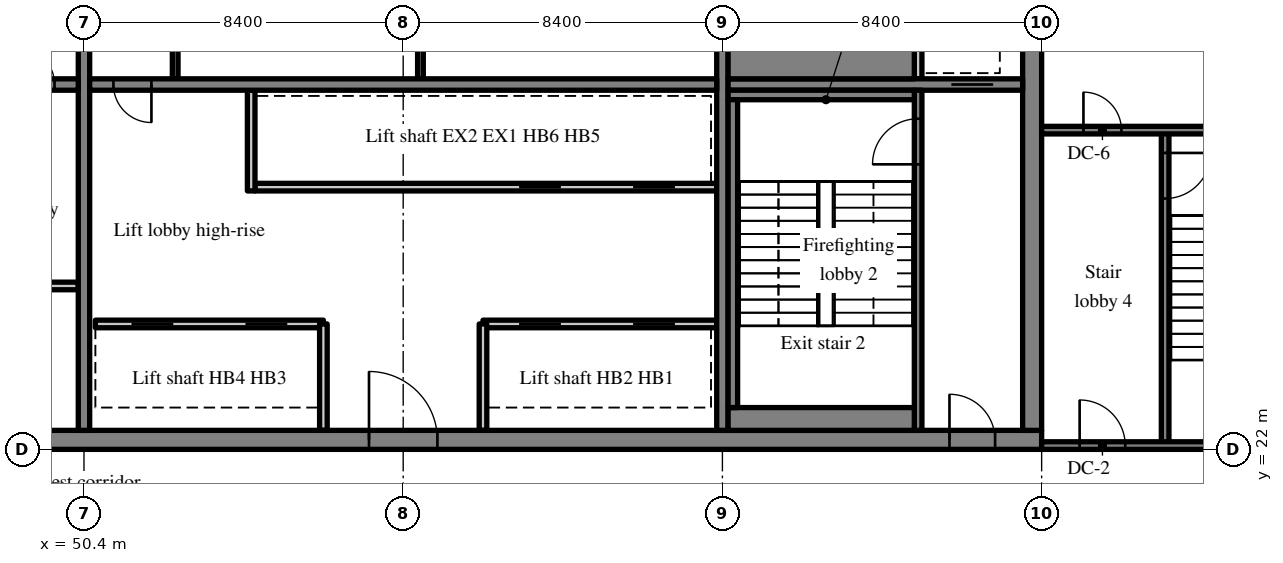
"""IFC4 building model, lengths in metres.
Left out: names, types, materials, properties, quantities, classifications, styles, units other than length and angle.
Written with IfcOpenShell. Run it as: python <this file> out.ifc"""

import sys

from ifc_helpers import new_model, si_unit, direction, frame, frame_2d, origin, place, context, subcontext, project, spatial, rectangle, extrude, source, transform, mapped, element, fill, save


model = new_model("IFC4")
c1 = context("Model", 3, precision=1e-05, world=origin(), true_north=direction((0.0, 1.0)))
c2 = subcontext(c1, "Body", "Model", "MODEL_VIEW")
j1 = project(units=[si_unit("LENGTHUNIT", "METRE"), si_unit("PLANEANGLEUNIT", "RADIAN")], contexts=[c1])
p1 = place(None, origin())
s1 = spatial("IfcSite", under=j1, at=p1, CompositionType="ELEMENT")
p2 = place(p1, origin())
s2 = spatial("IfcBuilding", under=s1, at=p2, CompositionType="ELEMENT")
p3 = place(p2, frame((0.0, 0.0, 285.7)))
s3 = spatial("IfcBuildingStorey", under=s2, at=p3, CompositionType="ELEMENT", Elevation=285.7)
m1 = source(origin(), c2, "Body", "SweptSolid", [
    extrude(rectangle(XDim=50.4, YDim=0.5, at=frame_2d((25.2, 0.0))), origin(), (0.0, 0.0, 1.0), 3.72),
])
p4 = place(p3, frame((25.2, 22.25, 0.0), z_axis=(0.0, 0.0, 1.0), x_axis=(1.0, 0.0, 0.0)))
e1 = element("IfcWall", 1, at=p4, inside=s3, PredefinedType="SHEAR", context=c2, shape_type="MappedRepresentation", body=[
    mapped(m1, transform((0.0, 0.0, 0.0), scale=1.0)),
])
m2 = source(origin(), c2, "Body", "SweptSolid", [
    extrude(rectangle(XDim=1.8, YDim=2.1, at=frame_2d((0.9, 1.05))), frame((0.0, 0.26, 0.0), z_axis=(0.0, -1.0, 0.0), x_axis=(1.0, 0.0, 0.0)), (0.0, 0.0, 1.0), 0.52),
])
p5 = place(p4, frame((15.9, 0.0, 0.0)))
e2 = element("IfcOpeningElement", 2, at=p5, cuts=e1, PredefinedType="OPENING", context=c2, shape_type="MappedRepresentation", body=[
    mapped(m2, transform((0.0, 0.0, 0.0), scale=1.0)),
])
m3 = source(origin(), c2, "Body", "SweptSolid", [
    extrude(rectangle(XDim=0.9, YDim=2.1, at=frame_2d((0.45, 1.05))), frame((0.0, 0.26, 0.0), z_axis=(0.0, -1.0, 0.0), x_axis=(1.0, 0.0, 0.0)), (0.0, 0.0, 1.0), 0.52),
])
p6 = place(p4, frame((21.525, 0.0, 0.0)))
e3 = element("IfcOpeningElement", 3, at=p6, cuts=e1, PredefinedType="OPENING", context=c2, shape_type="MappedRepresentation", body=[
    mapped(m3, transform((0.0, 0.0, 0.0), scale=1.0)),
])
p7 = place(p4, frame((32.7, 0.0, 0.0)))
e4 = element("IfcOpeningElement", 4, at=p7, cuts=e1, PredefinedType="OPENING", context=c2, shape_type="MappedRepresentation", body=[
    mapped(m2, transform((0.0, 0.0, 0.0), scale=1.0)),
])
m4 = source(origin(), c2, "Body", "SweptSolid", [
    extrude(rectangle(XDim=1.2, YDim=2.1, at=frame_2d((0.6, 1.05))), frame((0.0, 0.26, 0.0), z_axis=(0.0, -1.0, 0.0), x_axis=(1.0, 0.0, 0.0)), (0.0, 0.0, 1.0), 0.52),
])
p8 = place(p4, frame((6.5, 0.0, 0.0)))
e5 = element("IfcOpeningElement", 5, at=p8, cuts=e1, PredefinedType="OPENING", context=c2, shape_type="MappedRepresentation", body=[
    mapped(m4, transform((0.0, 0.0, 0.0), scale=1.0)),
])
p9 = place(p4, frame((47.975, 0.0, 0.0)))
e6 = element("IfcOpeningElement", 6, at=p9, cuts=e1, PredefinedType="OPENING", context=c2, shape_type="MappedRepresentation", body=[
    mapped(m4, transform((0.0, 0.0, 0.0), scale=1.0)),
])
m5 = source(origin(), c2, "Body", "SweptSolid", [
    extrude(rectangle(XDim=19.0, YDim=0.5, at=frame_2d((9.5, 0.0))), origin(), (0.0, 0.0, 1.0), 3.72),
])
p10 = place(p3, frame((75.35, 22.5, 0.0), z_axis=(0.0, 0.0, 1.0), x_axis=(0.0, 1.0, 0.0)))
e7 = element("IfcWall", 7, at=p10, inside=s3, PredefinedType="SHEAR", context=c2, shape_type="MappedRepresentation", body=[
    mapped(m5, transform((0.0, 0.0, 0.0), scale=1.0)),
])
p11 = place(p10, frame((12.9, 0.0, 0.0)))
e8 = element("IfcOpeningElement", 8, at=p11, cuts=e7, PredefinedType="OPENING", context=c2, shape_type="MappedRepresentation", body=[
    mapped(m4, transform((0.0, 0.0, 0.0), scale=1.0)),
])
m6 = source(origin(), c2, "Body", "SweptSolid", [
    extrude(rectangle(XDim=19.0, YDim=0.3, at=frame_2d((9.5, 0.0))), origin(), (0.0, 0.0, 1.0), 3.72),
])
p12 = place(p3, frame((50.4, 22.5, 0.0), z_axis=(0.0, 0.0, 1.0), x_axis=(0.0, 1.0, 0.0)))
e9 = element("IfcWall", 9, at=p12, inside=s3, PredefinedType="SHEAR", context=c2, shape_type="MappedRepresentation", body=[
    mapped(m6, transform((0.0, 0.0, 0.0), scale=1.0)),
])
m7 = source(origin(), c2, "Body", "SweptSolid", [
    extrude(rectangle(XDim=1.1, YDim=2.1, at=frame_2d((0.55, 1.05))), frame((0.0, 0.16, 0.0), z_axis=(0.0, -1.0, 0.0), x_axis=(1.0, 0.0, 0.0)), (0.0, 0.0, 1.0), 0.32),
])
p13 = place(p12, frame((12.95, 0.0, 0.0)))
e10 = element("IfcOpeningElement", 10, at=p13, cuts=e9, PredefinedType="OPENING", context=c2, shape_type="MappedRepresentation", body=[
    mapped(m7, transform((0.0, 0.0, 0.0), scale=1.0)),
])
p14 = place(p3, frame((67.2, 22.5, 0.0), z_axis=(0.0, 0.0, 1.0), x_axis=(0.0, 1.0, 0.0)))
e11 = element("IfcWall", 11, at=p14, inside=s3, PredefinedType="SHEAR", context=c2, shape_type="MappedRepresentation", body=[
    mapped(m6, transform((0.0, 0.0, 0.0), scale=1.0)),
])
m8 = source(origin(), c2, "Body", "SweptSolid", [
    extrude(rectangle(XDim=16.5, YDim=0.3, at=frame_2d((8.25, 0.0))), origin(), (0.0, 0.0, 1.0), 3.72),
])
p15 = place(p3, frame((33.75, 31.6, 0.0), z_axis=(0.0, 0.0, 1.0), x_axis=(1.0, 0.0, 0.0)))
e12 = element("IfcWall", 12, at=p15, inside=s3, PredefinedType="SHEAR", context=c2, shape_type="MappedRepresentation", body=[
    mapped(m8, transform((0.0, 0.0, 0.0), scale=1.0)),
])
m9 = source(origin(), c2, "Body", "SweptSolid", [
    extrude(rectangle(XDim=1.0, YDim=2.1, at=frame_2d((0.5, 1.05))), frame((0.0, 0.16, 0.0), z_axis=(0.0, -1.0, 0.0), x_axis=(1.0, 0.0, 0.0)), (0.0, 0.0, 1.0), 0.32),
])
p16 = place(p15, frame((14.875, 0.0, 0.0)))
e13 = element("IfcOpeningElement", 13, at=p16, cuts=e12, PredefinedType="OPENING", context=c2, shape_type="MappedRepresentation", body=[
    mapped(m9, transform((0.0, 0.0, 0.0), scale=1.0)),
])
p17 = place(p3, frame((50.55, 31.6, 0.0), z_axis=(0.0, 0.0, 1.0), x_axis=(1.0, 0.0, 0.0)))
e14 = element("IfcWall", 14, at=p17, inside=s3, PredefinedType="SHEAR", context=c2, shape_type="MappedRepresentation", body=[
    mapped(m8, transform((0.0, 0.0, 0.0), scale=1.0)),
])
p18 = place(p17, frame((0.625, 0.0, 0.0)))
e15 = element("IfcOpeningElement", 15, at=p18, cuts=e14, PredefinedType="OPENING", context=c2, shape_type="MappedRepresentation", body=[
    mapped(m9, transform((0.0, 0.0, 0.0), scale=1.0)),
])
m10 = source(origin(), c2, "Body", "SweptSolid", [
    extrude(rectangle(XDim=7.75, YDim=0.3, at=frame_2d((3.875, 0.0))), origin(), (0.0, 0.0, 1.0), 3.72),
])
p19 = place(p3, frame((67.35, 31.6, 0.0), z_axis=(0.0, 0.0, 1.0), x_axis=(1.0, 0.0, 0.0)))
e16 = element("IfcWall", 16, at=p19, inside=s3, PredefinedType="SHEAR", context=c2, shape_type="MappedRepresentation", body=[
    mapped(m10, transform((0.0, 0.0, 0.0), scale=1.0)),
])
p20 = place(p19, frame((5.875, 0.0, 0.0)))
e17 = element("IfcOpeningElement", 17, at=p20, cuts=e16, PredefinedType="OPENING", context=c2, shape_type="MappedRepresentation", body=[
    mapped(m7, transform((0.0, 0.0, 0.0), scale=1.0)),
])
m11 = source(origin(), c2, "Body", "SweptSolid", [
    extrude(rectangle(XDim=6.15, YDim=0.2, at=frame_2d((3.075, 0.0))), origin(), (0.0, 0.0, 1.0), 3.72),
])
p21 = place(p3, frame((44.1, 26.3, 0.0), z_axis=(0.0, 0.0, 1.0), x_axis=(1.0, 0.0, 0.0)))
e18 = element("IfcWall", 18, at=p21, inside=s3, PredefinedType="PARTITIONING", context=c2, shape_type="MappedRepresentation", body=[
    mapped(m11, transform((0.0, 0.0, 0.0), scale=1.0)),
])
m12 = source(origin(), c2, "Body", "SweptSolid", [
    extrude(rectangle(XDim=6.15, YDim=0.2, at=frame_2d((3.075, 0.0))), origin(), (0.0, 0.0, 1.0), 3.72),
])
p22 = place(p3, frame((67.05, 25.3, 0.0), z_axis=(0.0, 0.0, 1.0), x_axis=(-1.0, 0.0, 0.0)))
e19 = element("IfcWall", 19, at=p22, inside=s3, PredefinedType="SOLIDWALL", context=c2, shape_type="MappedRepresentation", body=[
    mapped(m12, transform((0.0, 0.0, 0.0), scale=1.0)),
])
m13 = source(origin(), c2, "Body", "SweptSolid", [
    extrude(rectangle(XDim=1.1, YDim=2.1, at=frame_2d((0.55, 1.05))), frame((0.0, 0.11, 0.0), z_axis=(0.0, -1.0, 0.0), x_axis=(1.0, 0.0, 0.0)), (0.0, 0.0, 1.0), 0.22),
])
p23 = place(p22, frame((1.1, 0.0, 0.0)))
e20 = element("IfcOpeningElement", 20, at=p23, cuts=e19, PredefinedType="OPENING", context=c2, shape_type="MappedRepresentation", body=[
    mapped(m13, transform((0.0, 0.0, 0.0), scale=1.0)),
])
p24 = place(p22, frame((4.1, 0.0, 0.0)))
e21 = element("IfcOpeningElement", 21, at=p24, cuts=e19, PredefinedType="OPENING", context=c2, shape_type="MappedRepresentation", body=[
    mapped(m13, transform((0.0, 0.0, 0.0), scale=1.0)),
])
m14 = source(origin(), c2, "Body", "SweptSolid", [
    extrude(rectangle(XDim=6.0, YDim=0.2, at=frame_2d((3.0, 0.0))), origin(), (0.0, 0.0, 1.0), 3.72),
])
p25 = place(p3, frame((56.7, 25.3, 0.0), z_axis=(0.0, 0.0, 1.0), x_axis=(-1.0, 0.0, 0.0)))
e22 = element("IfcWall", 22, at=p25, inside=s3, PredefinedType="SOLIDWALL", context=c2, shape_type="MappedRepresentation", body=[
    mapped(m14, transform((0.0, 0.0, 0.0), scale=1.0)),
])
p26 = place(p25, frame((0.95, 0.0, 0.0)))
e23 = element("IfcOpeningElement", 23, at=p26, cuts=e22, PredefinedType="OPENING", context=c2, shape_type="MappedRepresentation", body=[
    mapped(m13, transform((0.0, 0.0, 0.0), scale=1.0)),
])
p27 = place(p25, frame((3.95, 0.0, 0.0)))
e24 = element("IfcOpeningElement", 24, at=p27, cuts=e22, PredefinedType="OPENING", context=c2, shape_type="MappedRepresentation", body=[
    mapped(m13, transform((0.0, 0.0, 0.0), scale=1.0)),
])
m15 = source(origin(), c2, "Body", "SweptSolid", [
    extrude(rectangle(XDim=12.15, YDim=0.2, at=frame_2d((6.075, 0.0))), origin(), (0.0, 0.0, 1.0), 3.72),
])
p28 = place(p3, frame((67.05, 28.9, 0.0), z_axis=(0.0, 0.0, 1.0), x_axis=(-1.0, 0.0, 0.0)))
e25 = element("IfcWall", 25, at=p28, inside=s3, PredefinedType="SOLIDWALL", context=c2, shape_type="MappedRepresentation", body=[
    mapped(m15, transform((0.0, 0.0, 0.0), scale=1.0)),
])
p29 = place(p28, frame((1.1, 0.0, 0.0)))
e26 = element("IfcOpeningElement", 26, at=p29, cuts=e25, PredefinedType="OPENING", context=c2, shape_type="MappedRepresentation", body=[
    mapped(m13, transform((0.0, 0.0, 0.0), scale=1.0)),
])
p30 = place(p28, frame((4.1, 0.0, 0.0)))
e27 = element("IfcOpeningElement", 27, at=p30, cuts=e25, PredefinedType="OPENING", context=c2, shape_type="MappedRepresentation", body=[
    mapped(m13, transform((0.0, 0.0, 0.0), scale=1.0)),
])
m16 = source(origin(), c2, "Body", "SweptSolid", [
    extrude(rectangle(XDim=2.8, YDim=0.2, at=frame_2d((1.4, 0.0))), origin(), (0.0, 0.0, 1.0), 3.72),
])
for number, where, z_axis, x_axis in (
    (28, (60.9, 22.5, 0.0), (0.0, 0.0, 1.0), (0.0, 1.0, 0.0)),
    (29, (56.7, 22.5, 0.0), (0.0, 0.0, 1.0), (0.0, 1.0, 0.0)),
):
    element("IfcWall", number, at=place(p3, frame(where, z_axis=z_axis, x_axis=x_axis)), inside=s3, PredefinedType="SOLIDWALL", context=c2, shape_type="MappedRepresentation", body=[
        mapped(m16, transform((0.0, 0.0, 0.0), scale=1.0)),
    ])
m17 = source(origin(), c2, "Body", "SweptSolid", [
    extrude(rectangle(XDim=2.65, YDim=0.2, at=frame_2d((1.325, 0.0))), origin(), (0.0, 0.0, 1.0), 3.72),
])
p31 = place(p3, frame((54.8, 28.8, 0.0), z_axis=(0.0, 0.0, 1.0), x_axis=(0.0, 1.0, 0.0)))
e30 = element("IfcWall", 30, at=p31, inside=s3, PredefinedType="SOLIDWALL", context=c2, shape_type="MappedRepresentation", body=[
    mapped(m17, transform((0.0, 0.0, 0.0), scale=1.0)),
])
m18 = source(origin(), c2, "Body", "SweptSolid", [
    extrude(rectangle(XDim=3.25, YDim=0.15, at=frame_2d((1.625, 0.0))), origin(), (0.0, 0.0, 1.0), 3.72),
])
for number, where, z_axis, x_axis in (
    (31, (52.8, 31.75, 0.0), (0.0, 0.0, 1.0), (0.0, 1.0, 0.0)),
    (32, (59.254, 31.75, 0.0), (0.0, 0.0, 1.0), (0.0, 1.0, 0.0)),
):
    element("IfcWall", number, at=place(p3, frame(where, z_axis=z_axis, x_axis=x_axis)), inside=s3, PredefinedType="PARTITIONING", context=c2, shape_type="MappedRepresentation", body=[
        mapped(m18, transform((0.0, 0.0, 0.0), scale=1.0)),
    ])
m19 = source(origin(), c2, "Body", "SweptSolid", [
    extrude(rectangle(XDim=8.95, YDim=0.2, at=frame_2d((4.475, 0.0))), origin(), (0.0, 0.0, 1.0), 3.72),
])
p32 = place(p3, frame((72.35, 22.5, 0.0), z_axis=(0.0, 0.0, 1.0), x_axis=(0.0, 1.0, 0.0)))
e33 = element("IfcWall", 33, at=p32, inside=s3, PredefinedType="SOLIDWALL", context=c2, shape_type="MappedRepresentation", body=[
    mapped(m19, transform((0.0, 0.0, 0.0), scale=1.0)),
])
m20 = source(origin(), c2, "Body", "SweptSolid", [
    extrude(rectangle(XDim=1.2, YDim=2.1, at=frame_2d((0.6, 1.05))), frame((0.0, 0.11, 0.0), z_axis=(0.0, -1.0, 0.0), x_axis=(1.0, 0.0, 0.0)), (0.0, 0.0, 1.0), 0.22),
])
p33 = place(p32, frame((7.0, 0.0, 0.0)))
e34 = element("IfcOpeningElement", 34, at=p33, cuts=e33, PredefinedType="OPENING", context=c2, shape_type="MappedRepresentation", body=[
    mapped(m20, transform((0.0, 0.0, 0.0), scale=1.0)),
])
m21 = source(origin(), c2, "Body", "SweptSolid", [
    extrude(rectangle(XDim=1.85, YDim=0.2, at=frame_2d((0.925, 0.0))), origin(), (0.0, 0.0, 1.0), 3.72),
])
p34 = place(p3, frame((72.35, 31.75, 0.0), z_axis=(0.0, 0.0, 1.0), x_axis=(0.0, 1.0, 0.0)))
e35 = element("IfcWall", 35, at=p34, inside=s3, PredefinedType="SOLIDWALL", context=c2, shape_type="MappedRepresentation", body=[
    mapped(m21, transform((0.0, 0.0, 0.0), scale=1.0)),
])
m22 = source(origin(), c2, "Body", "SweptSolid", [
    extrude(rectangle(XDim=8.3, YDim=0.2, at=frame_2d((4.15, 0.0))), origin(), (0.0, 0.0, 1.0), 3.72),
])
p35 = place(p3, frame((78.85, 22.1, 0.0), z_axis=(0.0, 0.0, 1.0), x_axis=(0.0, 1.0, 0.0)))
e36 = element("IfcWall", 36, at=p35, inside=s3, PredefinedType="SOLIDWALL", context=c2, shape_type="MappedRepresentation", body=[
    mapped(m22, transform((0.0, 0.0, 0.0), scale=1.0)),
])
p36 = place(p35, frame((6.5, 0.0, 0.0)))
e37 = element("IfcOpeningElement", 37, at=p36, cuts=e36, PredefinedType="OPENING", context=c2, shape_type="MappedRepresentation", body=[
    mapped(m20, transform((0.0, 0.0, 0.0), scale=1.0)),
])
m23 = source(origin(), c2, "Body", "SweptSolid", [
    extrude(rectangle(XDim=8.15, YDim=0.2, at=frame_2d((4.075, 0.0))), origin(), (0.0, 0.0, 1.0), 3.72),
])
p37 = place(p3, frame((83.75, 22.1, 0.0), z_axis=(0.0, 0.0, 1.0), x_axis=(-1.0, 0.0, 0.0)))
e38 = element("IfcWall", 38, at=p37, inside=s3, PredefinedType="SOLIDWALL", context=c2, shape_type="MappedRepresentation", body=[
    mapped(m23, transform((0.0, 0.0, 0.0), scale=1.0)),
])
p38 = place(p37, frame((5.95, 0.0, 0.0)))
e39 = element("IfcOpeningElement", 39, at=p38, cuts=e38, PredefinedType="OPENING", context=c2, shape_type="MappedRepresentation", body=[
    mapped(m20, transform((0.0, 0.0, 0.0), scale=1.0)),
])
p39 = place(p3, frame((83.75, 30.4, 0.0), z_axis=(0.0, 0.0, 1.0), x_axis=(-1.0, 0.0, 0.0)))
e40 = element("IfcWall", 40, at=p39, inside=s3, PredefinedType="SOLIDWALL", context=c2, shape_type="MappedRepresentation", body=[
    mapped(m23, transform((0.0, 0.0, 0.0), scale=1.0)),
])
m24 = source(origin(), c2, "Body", "SweptSolid", [
    extrude(rectangle(XDim=1.0, YDim=2.1, at=frame_2d((0.5, 1.05))), frame((0.0, 0.11, 0.0), z_axis=(0.0, -1.0, 0.0), x_axis=(1.0, 0.0, 0.0)), (0.0, 0.0, 1.0), 0.22),
])
p40 = place(p39, frame((6.05, 0.0, 0.0)))
e41 = element("IfcOpeningElement", 41, at=p40, cuts=e40, PredefinedType="OPENING", context=c2, shape_type="MappedRepresentation", body=[
    mapped(m24, transform((0.0, 0.0, 0.0), scale=1.0)),
])
m25 = source(origin(), c2, "Body", "SweptSolid", [
    extrude(rectangle(XDim=4.9, YDim=0.6, at=frame_2d((2.45, 0.0))), origin(), (0.0, 0.0, 1.0), 3.72),
])
p41 = place(p3, frame((67.35, 22.8, 0.0), z_axis=(0.0, 0.0, 1.0), x_axis=(1.0, 0.0, 0.0)))
e42 = element("IfcWall", 42, at=p41, inside=s3, PredefinedType="SOLIDWALL", context=c2, shape_type="MappedRepresentation", body=[
    mapped(m25, transform((0.0, 0.0, 0.0), scale=1.0)),
])
m26 = source(origin(), c2, "Body", "SweptSolid", [
    extrude(rectangle(XDim=4.9, YDim=0.25, at=frame_2d((2.45, 0.0))), origin(), (0.0, 0.0, 1.0), 3.72),
])
p42 = place(p3, frame((67.35, 31.325, 0.0), z_axis=(0.0, 0.0, 1.0), x_axis=(1.0, 0.0, 0.0)))
e43 = element("IfcWall", 43, at=p42, inside=s3, PredefinedType="SOLIDWALL", context=c2, shape_type="MappedRepresentation", body=[
    mapped(m26, transform((0.0, 0.0, 0.0), scale=1.0)),
])
m27 = source(origin(), c2, "Body", "SweptSolid", [
    extrude(rectangle(XDim=8.1, YDim=0.25, at=frame_2d((4.05, 0.0))), origin(), (0.0, 0.0, 1.0), 3.72),
])
p43 = place(p3, frame((67.475, 23.1, 0.0), z_axis=(0.0, 0.0, 1.0), x_axis=(0.0, 1.0, 0.0)))
e44 = element("IfcWall", 44, at=p43, inside=s3, PredefinedType="SOLIDWALL", context=c2, shape_type="MappedRepresentation", body=[
    mapped(m27, transform((0.0, 0.0, 0.0), scale=1.0)),
])
m28 = source(origin(), c2, "Body", "SweptSolid", [
    extrude(rectangle(XDim=4.9, YDim=1.05, at=frame_2d((2.45, 0.0))), origin(), (0.0, 0.0, 1.0), 3.72),
])
p44 = place(p3, frame((67.35, 32.275, 0.0), z_axis=(0.0, 0.0, 1.0), x_axis=(1.0, 0.0, 0.0)))
e45 = element("IfcWall", 45, at=p44, inside=s3, PredefinedType="SOLIDWALL", context=c2, shape_type="MappedRepresentation", body=[
    mapped(m28, transform((0.0, 0.0, 0.0), scale=1.0)),
])
m29 = source(origin(), c2, "Body", "SweptSolid", [
    extrude(rectangle(XDim=1.0, YDim=2.1, at=frame_2d((0.5, 1.05))), frame((0.0, 0.025, 0.0), z_axis=(0.0, -1.0, 0.0), x_axis=(1.0, 0.0, 0.0)), (0.0, 0.0, 1.0), 0.05),
])
p45 = place(p16, origin())
e46 = element("IfcDoor", 46, at=p45, inside=s3, OperationType="SINGLE_SWING_LEFT", PredefinedType="DOOR", context=c2, shape_type="MappedRepresentation", body=[
    mapped(m29, transform((0.0, 0.0, 0.0), scale=1.0)),
])
fill(e13, e46)
m30 = source(origin(), c2, "Body", "SweptSolid", [
    extrude(rectangle(XDim=1.8, YDim=2.1, at=frame_2d((0.9, 1.05))), frame((0.0, 0.175, 0.0), z_axis=(0.0, -1.0, 0.0), x_axis=(1.0, 0.0, 0.0)), (0.0, 0.0, 1.0), 0.05),
])
p46 = place(p7, origin())
e47 = element("IfcDoor", 47, at=p46, inside=s3, OperationType="DOUBLE_DOOR_SINGLE_SWING", PredefinedType="DOOR", context=c2, shape_type="MappedRepresentation", body=[
    mapped(m30, transform((0.0, 0.0, 0.0), scale=1.0)),
])
fill(e4, e47)
p47 = place(p18, origin())
e48 = element("IfcDoor", 48, at=p47, inside=s3, OperationType="SINGLE_SWING_RIGHT", PredefinedType="DOOR", context=c2, shape_type="MappedRepresentation", body=[
    mapped(m29, transform((0.0, 0.0, 0.0), scale=1.0)),
])
fill(e15, e48)
m31 = source(origin(), c2, "Body", "SweptSolid", [
    extrude(rectangle(XDim=1.1, YDim=2.1, at=frame_2d((0.55, 1.05))), frame((0.0, 0.025, 0.0), z_axis=(0.0, -1.0, 0.0), x_axis=(1.0, 0.0, 0.0)), (0.0, 0.0, 1.0), 0.05),
])
p48 = place(p23, origin())
e49 = element("IfcDoor", 49, at=p48, inside=s3, OperationType="SLIDING_TO_RIGHT", PredefinedType="DOOR", context=c2, shape_type="MappedRepresentation", body=[
    mapped(m31, transform((0.0, 0.0, 0.0), scale=1.0)),
])
fill(e20, e49)
p49 = place(p24, origin())
e50 = element("IfcDoor", 50, at=p49, inside=s3, OperationType="SLIDING_TO_LEFT", PredefinedType="DOOR", context=c2, shape_type="MappedRepresentation", body=[
    mapped(m31, transform((0.0, 0.0, 0.0), scale=1.0)),
])
fill(e21, e50)
p50 = place(p26, origin())
e51 = element("IfcDoor", 51, at=p50, inside=s3, OperationType="SLIDING_TO_RIGHT", PredefinedType="DOOR", context=c2, shape_type="MappedRepresentation", body=[
    mapped(m31, transform((0.0, 0.0, 0.0), scale=1.0)),
])
fill(e23, e51)
p51 = place(p27, origin())
e52 = element("IfcDoor", 52, at=p51, inside=s3, OperationType="SLIDING_TO_LEFT", PredefinedType="DOOR", context=c2, shape_type="MappedRepresentation", body=[
    mapped(m31, transform((0.0, 0.0, 0.0), scale=1.0)),
])
fill(e24, e52)
p52 = place(p29, origin())
e53 = element("IfcDoor", 53, at=p52, inside=s3, OperationType="SLIDING_TO_RIGHT", PredefinedType="DOOR", context=c2, shape_type="MappedRepresentation", body=[
    mapped(m31, transform((0.0, 0.0, 0.0), scale=1.0)),
])
fill(e26, e53)
p53 = place(p30, origin())
e54 = element("IfcDoor", 54, at=p53, inside=s3, OperationType="SLIDING_TO_LEFT", PredefinedType="DOOR", context=c2, shape_type="MappedRepresentation", body=[
    mapped(m31, transform((0.0, 0.0, 0.0), scale=1.0)),
])
fill(e27, e54)
m32 = source(origin(), c2, "Body", "SweptSolid", [
    extrude(rectangle(XDim=1.2, YDim=2.1, at=frame_2d((0.6, 1.05))), frame((0.0, 0.025, 0.0), z_axis=(0.0, -1.0, 0.0), x_axis=(1.0, 0.0, 0.0)), (0.0, 0.0, 1.0), 0.05),
])
p54 = place(p33, origin())
e55 = element("IfcDoor", 55, at=p54, inside=s3, OperationType="SINGLE_SWING_LEFT", PredefinedType="DOOR", context=c2, shape_type="MappedRepresentation", body=[
    mapped(m32, transform((0.0, 0.0, 0.0), scale=1.0)),
])
fill(e34, e55)
m33 = source(origin(), c2, "Body", "SweptSolid", [
    extrude(rectangle(XDim=1.2, YDim=2.1, at=frame_2d((0.6, 1.05))), frame((0.0, 0.175, 0.0), z_axis=(0.0, -1.0, 0.0), x_axis=(1.0, 0.0, 0.0)), (0.0, 0.0, 1.0), 0.05),
])
p55 = place(p9, origin())
e56 = element("IfcDoor", 56, at=p55, inside=s3, OperationType="SINGLE_SWING_LEFT", PredefinedType="DOOR", context=c2, shape_type="MappedRepresentation", body=[
    mapped(m33, transform((0.0, 0.0, 0.0), scale=1.0)),
])
fill(e6, e56)
p56 = place(p20, origin())
e57 = element("IfcDoor", 57, at=p56, inside=s3, OperationType="SLIDING_TO_RIGHT", PredefinedType="DOOR", context=c2, shape_type="MappedRepresentation", body=[
    mapped(m31, transform((0.0, 0.0, 0.0), scale=1.0)),
])
fill(e17, e57)
p57 = place(p36, origin())
e58 = element("IfcDoor", 58, at=p57, inside=s3, OperationType="SINGLE_SWING_RIGHT", PredefinedType="DOOR", context=c2, shape_type="MappedRepresentation", body=[
    mapped(m32, transform((0.0, 0.0, 0.0), scale=1.0)),
])
fill(e37, e58)
p58 = place(p38, origin())
e59 = element("IfcDoor", 59, at=p58, inside=s3, OperationType="SINGLE_SWING_RIGHT", PredefinedType="DOOR", context=c2, shape_type="MappedRepresentation", body=[
    mapped(m32, transform((0.0, 0.0, 0.0), scale=1.0)),
])
fill(e39, e59)
p59 = place(p40, origin())
e60 = element("IfcDoor", 60, at=p59, inside=s3, OperationType="SINGLE_SWING_RIGHT", PredefinedType="DOOR", context=c2, shape_type="MappedRepresentation", body=[
    mapped(m29, transform((0.0, 0.0, 0.0), scale=1.0)),
])
fill(e41, e60)
save(model, sys.argv[1])
